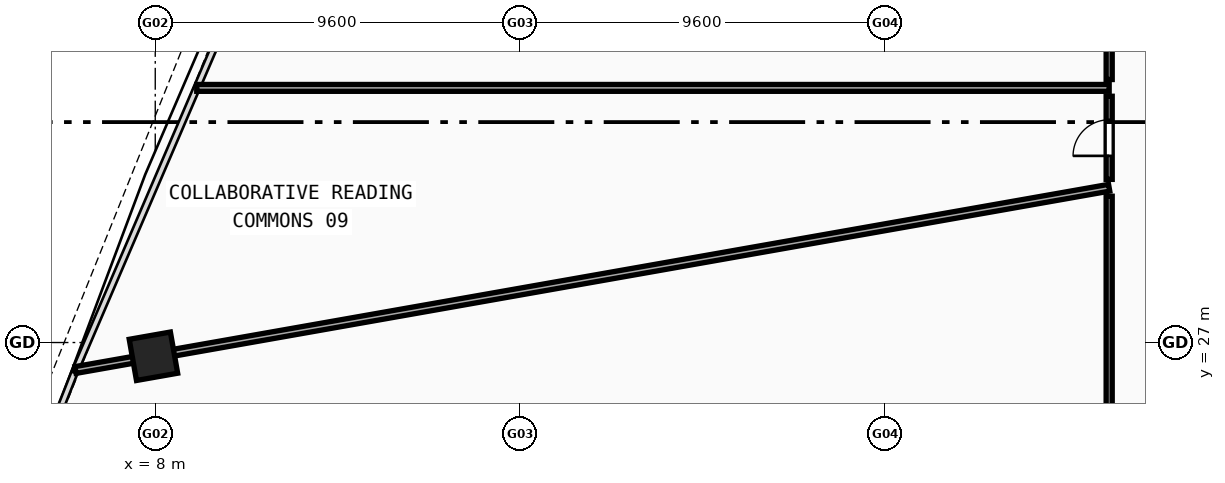
"""IFC4 building model, lengths in metres.
Left out: names, types, materials, properties, quantities, classifications, styles, units other than length and angle.
Written with IfcOpenShell. Run it as: python <this file> out.ifc"""

import sys

from ifc_helpers import new_model, si_unit, direction, frame, frame_2d, origin, origin_with_axes, origin_2d, place, context, subcontext, project, spatial, rectangle, hollow_rectangle, extrude, source, transform, mapped, element, fill, save


model = new_model("IFC4")
c1 = context("Model", 3, precision=1e-05, world=origin(), true_north=direction((0.0, 1.0)))
c2 = subcontext(c1, "Body", "Model", "MODEL_VIEW")
j1 = project(units=[si_unit("LENGTHUNIT", "METRE"), si_unit("PLANEANGLEUNIT", "RADIAN")], contexts=[c1])
p1 = place(None, origin())
s1 = spatial("IfcSite", under=j1, at=p1, CompositionType="ELEMENT")
p2 = place(p1, origin())
s2 = spatial("IfcBuilding", under=s1, at=p2, CompositionType="ELEMENT")
p3 = place(p2, frame((0.0, 0.0, 34.03)))
s3 = spatial("IfcBuildingStorey", under=s2, at=p3, CompositionType="ELEMENT", Elevation=34.03)
m1 = source(origin(), c2, "Body", "SweptSolid", [
    extrude(hollow_rectangle(XDim=1.1, YDim=1.1, WallThickness=0.045, at=origin_2d()), origin(), (0.0, 0.0, 1.0), 3.63),
])
p4 = place(p3, frame((7.952, 26.638, -0.26), z_axis=(0.0, 0.0, 1.0), x_axis=(0.173648177667, -0.984807753012, 0.0)))
e1 = element("IfcColumn", 1, at=p4, inside=s3, PredefinedType="COLUMN", context=c2, shape_type="MappedRepresentation", body=[
    mapped(m1, transform((0.0, 0.0, 0.0), scale=1.0)),
])
p5 = place(p3, frame((33.1, 33.7, 0.0), z_axis=(0.0, 0.0, 1.0), x_axis=(-1.0, 0.0, 0.0)))
e2 = element("IfcWall", 2, at=p5, inside=s3, PredefinedType="PARTITIONING", context=c2, shape_type="SweptSolid", body=[
    extrude(rectangle(XDim=24.008, YDim=0.18, at=frame_2d((12.004, 0.0))), origin(), (0.0, 0.0, 1.0), 2.67),
])
p6 = place(p3, frame((33.1, 31.073, 0.0), z_axis=(0.0, 0.0, 1.0), x_axis=(-0.98480731051, -0.173650687201, 0.0)))
e3 = element("IfcWall", 3, at=p6, inside=s3, PredefinedType="PARTITIONING", context=c2, shape_type="SweptSolid", body=[
    extrude(rectangle(XDim=27.618, YDim=0.18, at=frame_2d((13.809, 0.0))), origin(), (0.0, 0.0, 1.0), 2.67),
])
p7 = place(p3, frame((33.1, 24.8, 0.0), z_axis=(0.0, 0.0, 1.0), x_axis=(0.0, 1.0, 0.0)))
e4 = element("IfcWall", 4, at=p7, inside=s3, PredefinedType="PARTITIONING", context=c2, shape_type="SweptSolid", body=[
    extrude(rectangle(XDim=6.049, YDim=0.16, at=frame_2d((3.025, 0.0))), origin(), (0.0, 0.0, 1.0), 2.97),
])
p8 = place(p3, frame((33.1, 31.292, 0.0), z_axis=(0.0, 0.0, 1.0), x_axis=(0.0, 1.0, 0.0)))
e5 = element("IfcWall", 5, at=p8, inside=s3, PredefinedType="PARTITIONING", context=c2, shape_type="SweptSolid", body=[
    extrude(rectangle(XDim=2.188, YDim=0.16, at=frame_2d((1.094, 0.0))), origin(), (0.0, 0.0, 1.0), 3.37),
])
p9 = place(p8, frame((0.619, 0.0, 0.0)))
e6 = element("IfcOpeningElement", 6, at=p9, cuts=e5, PredefinedType="OPENING", context=c2, shape_type="SweptSolid", body=[
    extrude(rectangle(XDim=0.95, YDim=2.1, at=frame_2d((0.475, 1.05))), frame((0.0, 0.09, 0.0), z_axis=(0.0, -1.0, 0.0), x_axis=(1.0, 0.0, 0.0)), (0.0, 0.0, 1.0), 0.18),
])
p10 = place(p3, frame((33.1, 33.92, 0.0), z_axis=(0.0, 0.0, 1.0), x_axis=(0.0, 1.0, 0.0)))
e7 = element("IfcWall", 7, at=p10, inside=s3, PredefinedType="PARTITIONING", context=c2, shape_type="SweptSolid", body=[
    extrude(rectangle(XDim=4.402, YDim=0.16, at=frame_2d((2.201, 0.0))), origin(), (0.0, 0.0, 1.0), 3.37),
])
p11 = place(p10, frame((1.726, 0.0, 0.0)))
e8 = element("IfcOpeningElement", 8, at=p11, cuts=e7, PredefinedType="OPENING", context=c2, shape_type="SweptSolid", body=[
    extrude(rectangle(XDim=0.95, YDim=2.1, at=frame_2d((0.475, 1.05))), frame((0.0, 0.09, 0.0), z_axis=(0.0, -1.0, 0.0), x_axis=(1.0, 0.0, 0.0)), (0.0, 0.0, 1.0), 0.18),
])
m2 = source(origin(), c2, "Body", "SweptSolid", [
    extrude(rectangle(XDim=0.95, YDim=2.1, at=frame_2d((0.475, 1.05))), frame((0.0, 0.025, 0.0), z_axis=(0.0, -1.0, 0.0), x_axis=(1.0, 0.0, 0.0)), (0.0, 0.0, 1.0), 0.05),
])
p12 = place(p9, origin_with_axes())
e9 = element("IfcDoor", 9, at=p12, inside=s3, OperationType="SINGLE_SWING_LEFT", PredefinedType="DOOR", context=c2, shape_type="MappedRepresentation", body=[
    mapped(m2, transform((0.0, 0.0, 0.0), scale=1.0)),
])
fill(e6, e9)
save(model, sys.argv[1])
